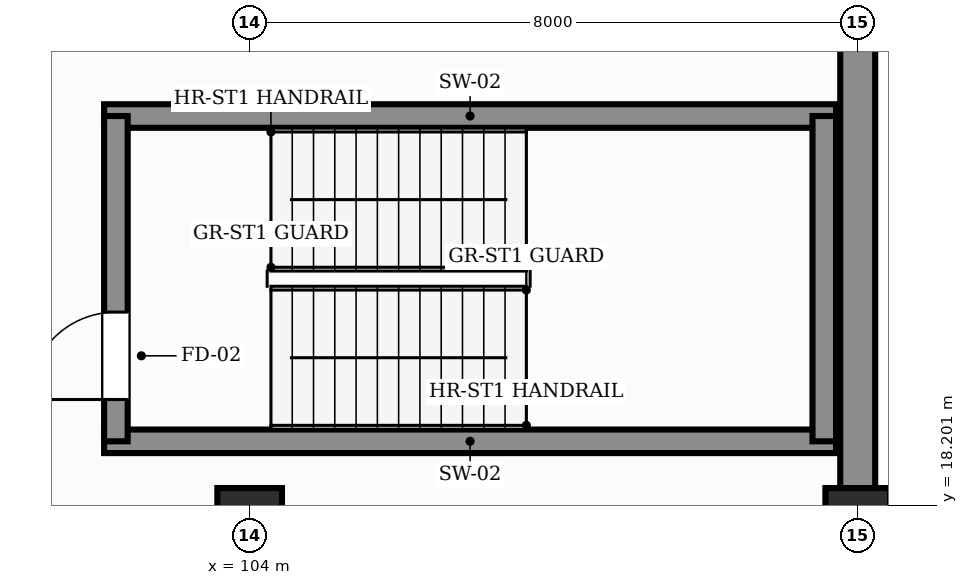
"""IFC4 building model, lengths in metres.
Left out: names, types, materials, properties, quantities, classifications, styles, units other than length and angle.
Written with IfcOpenShell. Run it as: python <this file> out.ifc"""

import sys

from ifc_helpers import new_model, si_unit, direction, frame, frame_2d, origin, origin_2d, place, context, subcontext, project, spatial, rectangle, extrude, element, fill, save


model = new_model("IFC4")
c1 = context("Model", 3, precision=1e-05, world=origin(), true_north=direction((0.0, 1.0)))
c2 = subcontext(c1, "Body", "Model", "MODEL_VIEW")
j1 = project(units=[si_unit("LENGTHUNIT", "METRE"), si_unit("PLANEANGLEUNIT", "RADIAN")], contexts=[c1])
p1 = place(None, origin())
s1 = spatial("IfcSite", under=j1, at=p1, CompositionType="ELEMENT")
p2 = place(p1, origin())
s2 = spatial("IfcBuilding", under=s1, at=p2, CompositionType="ELEMENT")
p3 = place(p2, frame((0.0, 0.0, -4.8)))
s3 = spatial("IfcBuildingStorey", under=s2, at=p3, CompositionType="ELEMENT", Elevation=-4.8)
for number, where, z_axis, x_axis in (
    (1, (104.0, 18.0, 0.0), (0.0, 0.0, 1.0), (1.0, 0.0, 0.0)),
    (2, (112.0, 18.0, 0.0), (0.0, 0.0, 1.0), (1.0, 0.0, 0.0)),
):
    element("IfcColumn", number, at=place(p3, frame(where, z_axis=z_axis, x_axis=x_axis)), inside=s3, PredefinedType="COLUMN", context=c2, shape_type="SweptSolid", body=[
        extrude(rectangle(XDim=0.85, YDim=0.85, at=origin_2d()), origin(), (0.0, 0.0, 1.0), 4.8),
    ])
p4 = place(p3, frame((112.0, 0.0, 0.0), z_axis=(0.0, 0.0, 1.0), x_axis=(0.0, 1.0, 0.0)))
e3 = element("IfcWall", 3, at=p4, inside=s3, PredefinedType="SOLIDWALL", context=c2, shape_type="SweptSolid", body=[
    extrude(rectangle(XDim=27.0, YDim=0.46, at=frame_2d((13.5, 0.0))), origin(), (0.0, 0.0, 1.0), 4.8),
])
for number, where, z_axis, x_axis in (
    (4, (102.085, 19.04, 0.0), (0.0, 0.0, 1.0), (1.0, 0.0, 0.0)),
    (5, (102.085, 23.32, 0.0), (0.0, 0.0, 1.0), (1.0, 0.0, 0.0)),
):
    element("IfcWall", number, at=place(p3, frame(where, z_axis=z_axis, x_axis=x_axis)), inside=s3, PredefinedType="SHEAR", context=c2, shape_type="SweptSolid", body=[
        extrude(rectangle(XDim=9.63, YDim=0.31, at=frame_2d((4.815, 0.0))), origin(), (0.0, 0.0, 1.0), 4.8),
    ])
p5 = place(p3, frame((102.24, 19.04, 0.0), z_axis=(0.0, 0.0, 1.0), x_axis=(0.0, 1.0, 0.0)))
e6 = element("IfcWall", 6, at=p5, inside=s3, PredefinedType="SHEAR", context=c2, shape_type="SweptSolid", body=[
    extrude(rectangle(XDim=4.28, YDim=0.31, at=frame_2d((2.14, 0.0))), origin(), (0.0, 0.0, 1.0), 4.8),
])
p6 = place(p5, frame((0.55, 0.0, 0.0)))
e7 = element("IfcOpeningElement", 7, at=p6, cuts=e6, PredefinedType="OPENING", context=c2, shape_type="SweptSolid", body=[
    extrude(rectangle(XDim=1.15, YDim=2.2, at=frame_2d((0.575, 1.1))), frame((0.0, 0.165, 0.0), z_axis=(0.0, -1.0, 0.0), x_axis=(1.0, 0.0, 0.0)), (0.0, 0.0, 1.0), 0.33),
])
p7 = place(p3, frame((111.56, 19.04, 0.0), z_axis=(0.0, 0.0, 1.0), x_axis=(0.0, 1.0, 0.0)))
e8 = element("IfcWall", 8, at=p7, inside=s3, PredefinedType="SHEAR", context=c2, shape_type="SweptSolid", body=[
    extrude(rectangle(XDim=4.28, YDim=0.31, at=frame_2d((2.14, 0.0))), origin(), (0.0, 0.0, 1.0), 4.8),
])
p8 = place(p6, origin())
e9 = element("IfcDoor", 9, at=p8, inside=s3, OperationType="SINGLE_SWING_LEFT", PredefinedType="DOOR", context=c2, shape_type="SweptSolid", body=[
    extrude(rectangle(XDim=1.15, YDim=2.2, at=frame_2d((0.575, 1.1))), frame((0.0, 0.025, 0.0), z_axis=(0.0, -1.0, 0.0), x_axis=(1.0, 0.0, 0.0)), (0.0, 0.0, 1.0), 0.05),
])
fill(e7, e9)
save(model, sys.argv[1])
